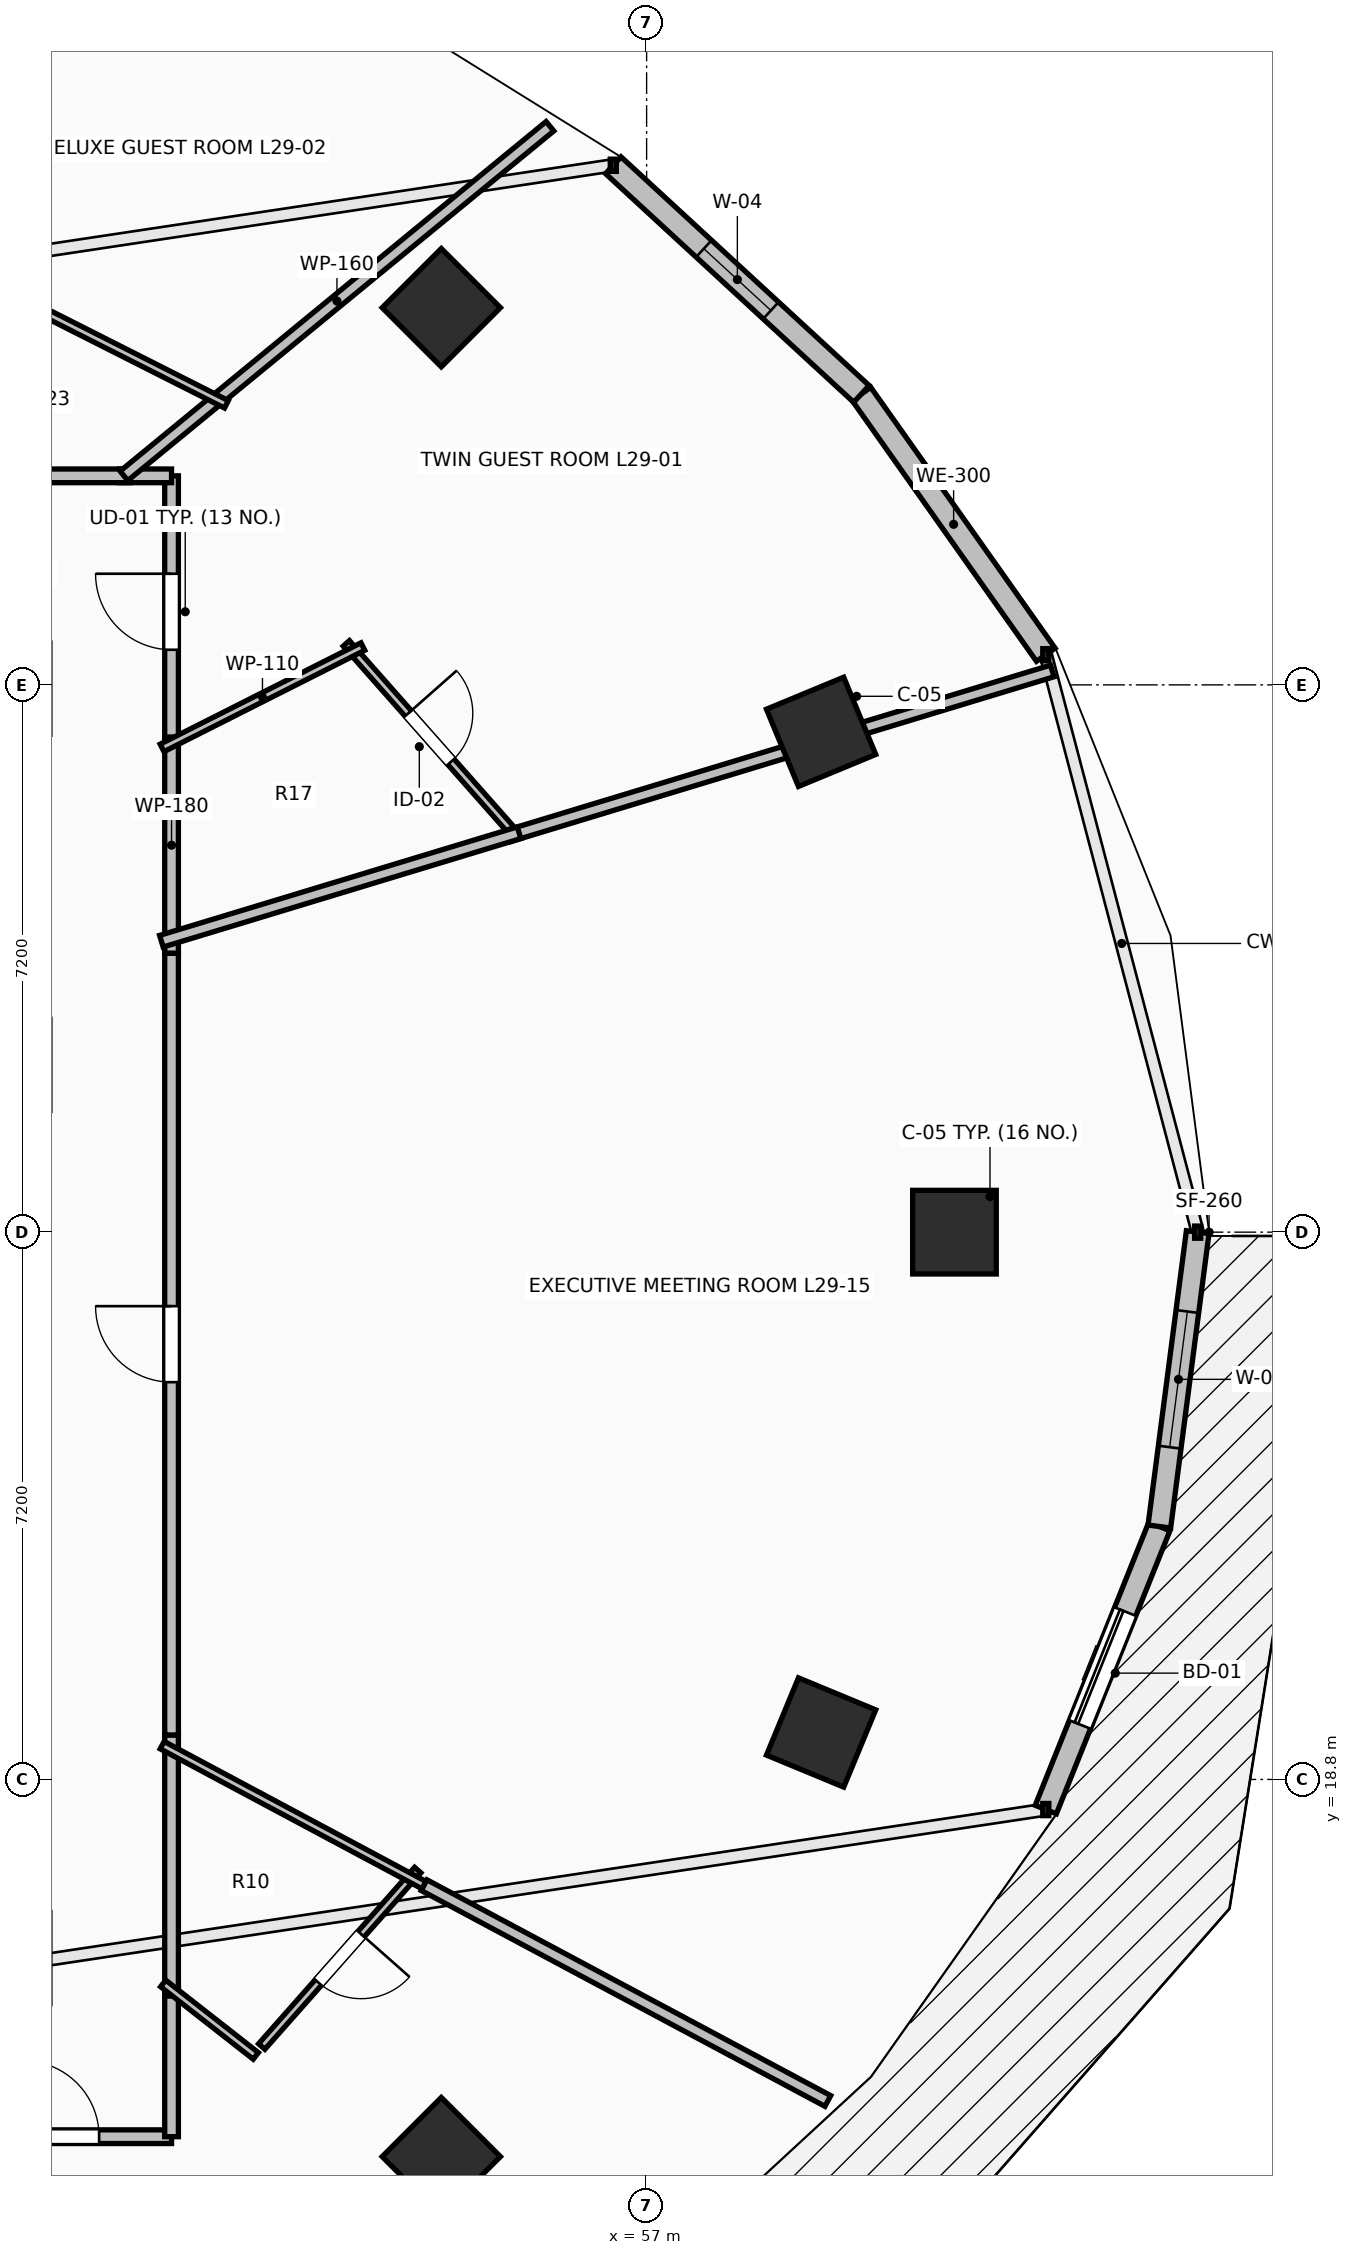
"""IFC4 building model, lengths in metres.
Left out: names, types, materials, properties, quantities, classifications, styles, units other than length and angle.
Written with IfcOpenShell. Run it as: python <this file> out.ifc"""

import sys

from ifc_helpers import new_model, si_unit, direction, frame, frame_2d, origin, origin_2d, place, context, subcontext, project, spatial, rectangle, extrude, element, fill, save


model = new_model("IFC4")
c1 = context("Model", 3, precision=1e-05, world=origin(), true_north=direction((0.0, 1.0)))
c2 = subcontext(c1, "Body", "Model", "MODEL_VIEW")
j1 = project(units=[si_unit("LENGTHUNIT", "METRE"), si_unit("PLANEANGLEUNIT", "RADIAN")], contexts=[c1])
p1 = place(None, origin())
s1 = spatial("IfcSite", under=j1, at=p1, CompositionType="ELEMENT")
p2 = place(p1, origin())
s2 = spatial("IfcBuilding", under=s1, at=p2, CompositionType="ELEMENT")
p3 = place(p2, frame((0.0, 0.0, 110.3)))
s3 = spatial("IfcBuildingStorey", under=s2, at=p3, CompositionType="ELEMENT", Elevation=110.3)
for number, where, z_axis, x_axis in (
    (1, (61.05, 26.0, 0.0), (0.0, 0.0, 1.0), (1.0, 0.0, 0.0)),
    (2, (59.295, 32.582, 0.0), (0.0, 0.0, 1.0), (0.924, 0.383, 0.0)),
    (3, (54.299, 38.162, 0.0), (0.0, 0.0, 1.0), (0.707, 0.707, 0.0)),
    (4, (54.299, 13.838, 0.0), (0.0, 0.0, 1.0), (0.707, -0.707, 0.0)),
    (5, (59.295, 19.418, 0.0), (0.0, 0.0, 1.0), (0.924, -0.383, 0.0)),
):
    element("IfcColumn", number, at=place(p3, frame(where, z_axis=z_axis, x_axis=x_axis)), inside=s3, PredefinedType="COLUMN", context=c2, shape_type="SweptSolid", body=[
        extrude(rectangle(XDim=1.1, YDim=1.1, at=origin_2d()), origin(), (0.0, 0.0, 1.0), 3.5),
    ])
p4 = place(p3, frame((62.252, 33.596, 0.0), z_axis=(0.0, 0.0, 1.0), x_axis=(-0.57716435238, 0.81662801222, 0.0)))
e6 = element("IfcWall", 6, at=p4, inside=s3, PredefinedType="STANDARD", context=c2, shape_type="SweptSolid", body=[
    extrude(rectangle(XDim=4.202, YDim=0.3, at=frame_2d((2.101, 0.0))), origin(), (0.0, 0.0, 1.0), 3.24),
])
p5 = place(p3, frame((59.826, 37.028, 0.0), z_axis=(0.0, 0.0, 1.0), x_axis=(-0.735416718093, 0.677615119924, 0.0)))
e7 = element("IfcWall", 7, at=p5, inside=s3, PredefinedType="STANDARD", context=c2, shape_type="SweptSolid", body=[
    extrude(rectangle(XDim=4.439, YDim=0.3, at=frame_2d((2.22, 0.0))), origin(), (0.0, 0.0, 1.0), 3.24),
])
p6 = place(p5, frame((1.619, 0.0, 0.85)))
e8 = element("IfcOpeningElement", 8, at=p6, cuts=e7, PredefinedType="OPENING", context=c2, shape_type="SweptSolid", body=[
    extrude(rectangle(XDim=1.2, YDim=1.95, at=frame_2d((0.6, 0.975))), frame((0.0, 0.165, 0.0), z_axis=(0.0, -1.0, 0.0), x_axis=(1.0, 0.0, 0.0)), (0.0, 0.0, 1.0), 0.33),
])
p7 = place(p3, frame((62.252, 18.404, 0.0), z_axis=(0.0, 0.0, 1.0), x_axis=(0.372345205928, 0.92809430966, 0.0)))
e9 = element("IfcWall", 9, at=p7, inside=s3, PredefinedType="STANDARD", context=c2, shape_type="SweptSolid", body=[
    extrude(rectangle(XDim=4.012, YDim=0.3, at=frame_2d((2.006, 0.0))), origin(), (0.0, 0.0, 1.0), 3.24),
])
p8 = place(p7, frame((1.206, 0.0, 0.0)))
e10 = element("IfcOpeningElement", 10, at=p8, cuts=e9, PredefinedType="OPENING", context=c2, shape_type="SweptSolid", body=[
    extrude(rectangle(XDim=1.6, YDim=2.3, at=frame_2d((0.8, 1.15))), frame((0.0, 0.165, 0.0), z_axis=(0.0, -1.0, 0.0), x_axis=(1.0, 0.0, 0.0)), (0.0, 0.0, 1.0), 0.33),
])
p9 = place(p3, frame((63.746, 22.127, 0.0), z_axis=(0.0, 0.0, 1.0), x_axis=(0.129157444793, 0.991624099372, 0.0)))
e11 = element("IfcWall", 11, at=p9, inside=s3, PredefinedType="STANDARD", context=c2, shape_type="SweptSolid", body=[
    extrude(rectangle(XDim=3.905, YDim=0.3, at=frame_2d((1.953, 0.0))), origin(), (0.0, 0.0, 1.0), 3.24),
])
p10 = place(p9, frame((1.052, 0.0, 0.85)))
e12 = element("IfcOpeningElement", 12, at=p10, cuts=e11, PredefinedType="OPENING", context=c2, shape_type="SweptSolid", body=[
    extrude(rectangle(XDim=1.8, YDim=2.19, at=frame_2d((0.9, 1.095))), frame((0.0, 0.165, 0.0), z_axis=(0.0, -1.0, 0.0), x_axis=(1.0, 0.0, 0.0)), (0.0, 0.0, 1.0), 0.33),
])
p11 = place(p3, frame((50.75, 32.374, 0.0), z_axis=(0.0, 0.0, 1.0), x_axis=(0.0, 1.0, 0.0)))
e13 = element("IfcWall", 13, at=p11, inside=s3, PredefinedType="PARTITIONING", context=c2, shape_type="SweptSolid", body=[
    extrude(rectangle(XDim=3.576, YDim=0.18, at=frame_2d((1.788, 0.0))), origin(), (0.0, 0.0, 1.0), 2.432),
])
p12 = place(p11, frame((1.288, 0.0, 0.0)))
e14 = element("IfcOpeningElement", 14, at=p12, cuts=e13, PredefinedType="OPENING", context=c2, shape_type="SweptSolid", body=[
    extrude(rectangle(XDim=1.0, YDim=2.15, at=frame_2d((0.5, 1.075))), frame((0.0, 0.105, 0.0), z_axis=(0.0, -1.0, 0.0), x_axis=(1.0, 0.0, 0.0)), (0.0, 0.0, 1.0), 0.21),
])
p13 = place(p3, frame((50.75, 35.95, 0.0), z_axis=(0.0, 0.0, 1.0), x_axis=(-1.0, 0.0, 0.0)))
e15 = element("IfcWall", 15, at=p13, inside=s3, PredefinedType="PARTITIONING", context=c2, shape_type="SweptSolid", body=[
    extrude(rectangle(XDim=0.686, YDim=0.18, at=frame_2d((0.343, 0.0))), origin(), (0.0, 0.0, 1.0), 3.24),
])
p14 = place(p3, frame((50.75, 29.668, 0.0), z_axis=(0.0, 0.0, 1.0), x_axis=(0.0, 1.0, 0.0)))
e16 = element("IfcWall", 16, at=p14, inside=s3, PredefinedType="PARTITIONING", context=c2, shape_type="SweptSolid", body=[
    extrude(rectangle(XDim=2.846, YDim=0.18, at=frame_2d((1.423, 0.0))), origin(), (0.0, 0.0, 1.0), 3.24),
])
p15 = place(p3, frame((50.204, 35.95, 0.0), z_axis=(0.0, 0.0, 1.0), x_axis=(-1.0, 0.0, 0.0)))
e17 = element("IfcWall", 17, at=p15, inside=s3, PredefinedType="PARTITIONING", context=c2, shape_type="SweptSolid", body=[
    extrude(rectangle(XDim=3.699, YDim=0.18, at=frame_2d((1.85, 0.0))), origin(), (0.0, 0.0, 1.0), 2.432),
])
p16 = place(p3, frame((47.844, 14.1, 0.0), z_axis=(0.0, 0.0, 1.0), x_axis=(1.0, 0.0, 0.0)))
e18 = element("IfcWall", 18, at=p16, inside=s3, PredefinedType="PARTITIONING", context=c2, shape_type="SweptSolid", body=[
    extrude(rectangle(XDim=2.906, YDim=0.18, at=frame_2d((1.453, 0.0))), origin(), (0.0, 0.0, 1.0), 2.432),
])
p17 = place(p16, frame((0.953, 0.0, 0.0)))
e19 = element("IfcOpeningElement", 19, at=p17, cuts=e18, PredefinedType="OPENING", context=c2, shape_type="SweptSolid", body=[
    extrude(rectangle(XDim=1.0, YDim=2.15, at=frame_2d((0.5, 1.075))), frame((0.0, 0.105, 0.0), z_axis=(0.0, -1.0, 0.0), x_axis=(1.0, 0.0, 0.0)), (0.0, 0.0, 1.0), 0.21),
])
p18 = place(p3, frame((50.75, 14.1, 0.0), z_axis=(0.0, 0.0, 1.0), x_axis=(0.0, 1.0, 0.0)))
e20 = element("IfcWall", 20, at=p18, inside=s3, PredefinedType="PARTITIONING", context=c2, shape_type="SweptSolid", body=[
    extrude(rectangle(XDim=1.99, YDim=0.18, at=frame_2d((0.995, 0.0))), origin(), (0.0, 0.0, 1.0), 2.432),
])
p19 = place(p3, frame((50.75, 15.95, 0.0), z_axis=(0.0, 0.0, 1.0), x_axis=(0.0, 1.0, 0.0)))
e21 = element("IfcWall", 21, at=p19, inside=s3, PredefinedType="PARTITIONING", context=c2, shape_type="SweptSolid", body=[
    extrude(rectangle(XDim=3.435, YDim=0.18, at=frame_2d((1.718, 0.0))), origin(), (0.0, 0.0, 1.0), 2.929),
])
p20 = place(p3, frame((50.75, 19.385, 0.0), z_axis=(0.0, 0.0, 1.0), x_axis=(0.0, 1.0, 0.0)))
e22 = element("IfcWall", 22, at=p20, inside=s3, PredefinedType="PARTITIONING", context=c2, shape_type="SweptSolid", body=[
    extrude(rectangle(XDim=10.283, YDim=0.18, at=frame_2d((5.142, 0.0))), origin(), (0.0, 0.0, 1.0), 2.432),
])
p21 = place(p20, frame((4.642, 0.0, 0.0)))
e23 = element("IfcOpeningElement", 23, at=p21, cuts=e22, PredefinedType="OPENING", context=c2, shape_type="SweptSolid", body=[
    extrude(rectangle(XDim=1.0, YDim=2.15, at=frame_2d((0.5, 1.075))), frame((0.0, 0.105, 0.0), z_axis=(0.0, -1.0, 0.0), x_axis=(1.0, 0.0, 0.0)), (0.0, 0.0, 1.0), 0.21),
])
p22 = place(p3, frame((53.049, 33.746, 0.0), z_axis=(0.0, 0.0, 1.0), x_axis=(0.662033979608, -0.749473821988, 0.0)))
e24 = element("IfcWall", 24, at=p22, inside=s3, PredefinedType="PARTITIONING", context=c2, shape_type="SweptSolid", body=[
    extrude(rectangle(XDim=3.309, YDim=0.11, at=frame_2d((1.654, 0.0))), origin(), (0.0, 0.0, 1.0), 2.432),
])
p23 = place(p22, frame((1.229, 0.0, 0.0)))
e25 = element("IfcOpeningElement", 25, at=p23, cuts=e24, PredefinedType="OPENING", context=c2, shape_type="SweptSolid", body=[
    extrude(rectangle(XDim=0.85, YDim=2.1, at=frame_2d((0.425, 1.05))), frame((0.0, 0.07, 0.0), z_axis=(0.0, -1.0, 0.0), x_axis=(1.0, 0.0, 0.0)), (0.0, 0.0, 1.0), 0.14),
])
p24 = place(p3, frame((50.625, 32.371, 0.0), z_axis=(0.0, 0.0, 1.0), x_axis=(0.892771184856, 0.450510389992, 0.0)))
e26 = element("IfcWall", 26, at=p24, inside=s3, PredefinedType="PARTITIONING", context=c2, shape_type="SweptSolid", body=[
    extrude(rectangle(XDim=2.959, YDim=0.11, at=frame_2d((1.48, 0.0))), origin(), (0.0, 0.0, 1.0), 2.432),
])
p25 = place(p3, frame((55.728, 40.549, 0.0), z_axis=(0.0, 0.0, 1.0), x_axis=(-0.773008157237, -0.634396081991, 0.0)))
e27 = element("IfcWall", 27, at=p25, inside=s3, PredefinedType="PARTITIONING", context=c2, shape_type="SweptSolid", body=[
    extrude(rectangle(XDim=7.25, YDim=0.16, at=frame_2d((3.625, 0.0))), origin(), (0.0, 0.0, 1.0), 2.677),
])
p26 = place(p3, frame((55.188, 31.214, 0.0), z_axis=(0.0, 0.0, 1.0), x_axis=(0.956927603812, 0.290326645457, 0.0)))
e28 = element("IfcWall", 28, at=p26, inside=s3, PredefinedType="PARTITIONING", context=c2, shape_type="SweptSolid", body=[
    extrude(rectangle(XDim=7.471, YDim=0.16, at=frame_2d((3.735, 0.0))), origin(), (0.0, 0.0, 1.0), 2.886),
])
p27 = place(p3, frame((50.616, 29.827, 0.0), z_axis=(0.0, 0.0, 1.0), x_axis=(0.956958408929, 0.290225091232, 0.0)))
e29 = element("IfcWall", 29, at=p27, inside=s3, PredefinedType="PARTITIONING", context=c2, shape_type="SweptSolid", body=[
    extrude(rectangle(XDim=4.918, YDim=0.16, at=frame_2d((2.459, 0.0))), origin(), (0.0, 0.0, 1.0), 2.929),
])
p28 = place(p3, frame((48.493, 38.396, 0.0), z_axis=(0.0, 0.0, 1.0), x_axis=(0.892546772035, -0.450954831142, 0.0)))
e30 = element("IfcWall", 30, at=p28, inside=s3, PredefinedType="PARTITIONING", context=c2, shape_type="SweptSolid", body=[
    extrude(rectangle(XDim=3.338, YDim=0.11, at=frame_2d((1.669, 0.0))), origin(), (0.0, 0.0, 1.0), 2.886),
])
p29 = place(p3, frame((51.802, 9.182, 0.0), z_axis=(0.0, 0.0, 1.0), x_axis=(-0.634357186002, 0.773040076948, 0.0)))
e31 = element("IfcWall", 31, at=p29, inside=s3, PredefinedType="PARTITIONING", context=c2, shape_type="SweptSolid", body=[
    extrude(rectangle(XDim=6.362, YDim=0.16, at=frame_2d((3.181, 0.0))), origin(), (0.0, 0.0, 1.0), 2.432),
])
p30 = place(p3, frame((53.989, 17.608, 0.0), z_axis=(0.0, 0.0, 1.0), x_axis=(-0.662322264705, -0.749219071885, 0.0)))
e32 = element("IfcWall", 32, at=p30, inside=s3, PredefinedType="PARTITIONING", context=c2, shape_type="SweptSolid", body=[
    extrude(rectangle(XDim=3.099, YDim=0.11, at=frame_2d((1.549, 0.0))), origin(), (0.0, 0.0, 1.0), 2.886),
])
p31 = place(p30, frame((1.125, 0.0, 0.0)))
e33 = element("IfcOpeningElement", 33, at=p31, cuts=e32, PredefinedType="OPENING", context=c2, shape_type="SweptSolid", body=[
    extrude(rectangle(XDim=0.85, YDim=2.1, at=frame_2d((0.425, 1.05))), frame((0.0, 0.07, 0.0), z_axis=(0.0, -1.0, 0.0), x_axis=(1.0, 0.0, 0.0)), (0.0, 0.0, 1.0), 0.14),
])
p32 = place(p3, frame((51.858, 15.163, 0.0), z_axis=(0.0, 0.0, 1.0), x_axis=(-0.787564922247, 0.61623168796, 0.0)))
e34 = element("IfcWall", 34, at=p32, inside=s3, PredefinedType="PARTITIONING", context=c2, shape_type="SweptSolid", body=[
    extrude(rectangle(XDim=1.548, YDim=0.11, at=frame_2d((0.774, 0.0))), origin(), (0.0, 0.0, 1.0), 2.432),
])
p33 = place(p3, frame((54.073, 17.409, 0.0), z_axis=(0.0, 0.0, 1.0), x_axis=(-0.881911515214, 0.47141497572, 0.0)))
e35 = element("IfcWall", 35, at=p33, inside=s3, PredefinedType="PARTITIONING", context=c2, shape_type="SweptSolid", body=[
    extrude(rectangle(XDim=3.907, YDim=0.11, at=frame_2d((1.954, 0.0))), origin(), (0.0, 0.0, 1.0), 2.886),
])
p34 = place(p3, frame((59.384, 14.57, 0.0), z_axis=(0.0, 0.0, 1.0), x_axis=(-0.881918302895, 0.471402277274, 0.0)))
e36 = element("IfcWall", 36, at=p34, inside=s3, PredefinedType="PARTITIONING", context=c2, shape_type="SweptSolid", body=[
    extrude(rectangle(XDim=6.023, YDim=0.16, at=frame_2d((3.011, 0.0))), origin(), (0.0, 0.0, 1.0), 2.677),
])
p35 = place(p8, origin())
e37 = element("IfcDoor", 37, at=p35, inside=s3, OperationType="SLIDING_TO_LEFT", PredefinedType="DOOR", context=c2, shape_type="SweptSolid", body=[
    extrude(rectangle(XDim=1.6, YDim=2.3, at=frame_2d((0.8, 1.15))), frame((0.0, 0.025, 0.0), z_axis=(0.0, -1.0, 0.0), x_axis=(1.0, 0.0, 0.0)), (0.0, 0.0, 1.0), 0.05),
])
fill(e10, e37)
p36 = place(p6, origin())
e38 = element("IfcWindow", 38, at=p36, inside=s3, PartitioningType="SINGLE_PANEL", PredefinedType="WINDOW", context=c2, shape_type="SweptSolid", body=[
    extrude(rectangle(XDim=1.2, YDim=1.95, at=frame_2d((0.6, 0.975))), frame((0.0, 0.03, 0.0), z_axis=(0.0, -1.0, 0.0), x_axis=(1.0, 0.0, 0.0)), (0.0, 0.0, 1.0), 0.06),
])
fill(e8, e38)
p37 = place(p10, origin())
e39 = element("IfcWindow", 39, at=p37, inside=s3, PartitioningType="SINGLE_PANEL", PredefinedType="WINDOW", context=c2, shape_type="SweptSolid", body=[
    extrude(rectangle(XDim=1.8, YDim=2.19, at=frame_2d((0.9, 1.095))), frame((0.0, 0.03, 0.0), z_axis=(0.0, -1.0, 0.0), x_axis=(1.0, 0.0, 0.0)), (0.0, 0.0, 1.0), 0.06),
])
fill(e12, e39)
p38 = place(p12, origin())
e40 = element("IfcDoor", 40, at=p38, inside=s3, OperationType="SINGLE_SWING_RIGHT", PredefinedType="DOOR", context=c2, shape_type="SweptSolid", body=[
    extrude(rectangle(XDim=1.0, YDim=2.15, at=frame_2d((0.5, 1.075))), frame((0.0, 0.025, 0.0), z_axis=(0.0, -1.0, 0.0), x_axis=(1.0, 0.0, 0.0)), (0.0, 0.0, 1.0), 0.05),
])
fill(e14, e40)
p39 = place(p17, origin())
e41 = element("IfcDoor", 41, at=p39, inside=s3, OperationType="SINGLE_SWING_LEFT", PredefinedType="DOOR", context=c2, shape_type="SweptSolid", body=[
    extrude(rectangle(XDim=1.0, YDim=2.15, at=frame_2d((0.5, 1.075))), frame((0.0, 0.025, 0.0), z_axis=(0.0, -1.0, 0.0), x_axis=(1.0, 0.0, 0.0)), (0.0, 0.0, 1.0), 0.05),
])
fill(e19, e41)
p40 = place(p21, origin())
e42 = element("IfcDoor", 42, at=p40, inside=s3, OperationType="SINGLE_SWING_RIGHT", PredefinedType="DOOR", context=c2, shape_type="SweptSolid", body=[
    extrude(rectangle(XDim=1.0, YDim=2.15, at=frame_2d((0.5, 1.075))), frame((0.0, 0.025, 0.0), z_axis=(0.0, -1.0, 0.0), x_axis=(1.0, 0.0, 0.0)), (0.0, 0.0, 1.0), 0.05),
])
fill(e23, e42)
p41 = place(p23, origin())
e43 = element("IfcDoor", 43, at=p41, inside=s3, OperationType="SINGLE_SWING_LEFT", PredefinedType="DOOR", context=c2, shape_type="SweptSolid", body=[
    extrude(rectangle(XDim=0.85, YDim=2.1, at=frame_2d((0.425, 1.05))), frame((0.0, 0.025, 0.0), z_axis=(0.0, -1.0, 0.0), x_axis=(1.0, 0.0, 0.0)), (0.0, 0.0, 1.0), 0.05),
])
fill(e25, e43)
p42 = place(p31, origin())
e44 = element("IfcDoor", 44, at=p42, inside=s3, OperationType="SINGLE_SWING_LEFT", PredefinedType="DOOR", context=c2, shape_type="SweptSolid", body=[
    extrude(rectangle(XDim=0.85, YDim=2.1, at=frame_2d((0.425, 1.05))), frame((0.0, 0.025, 0.0), z_axis=(0.0, -1.0, 0.0), x_axis=(1.0, 0.0, 0.0)), (0.0, 0.0, 1.0), 0.05),
])
fill(e33, e44)
save(model, sys.argv[1])
